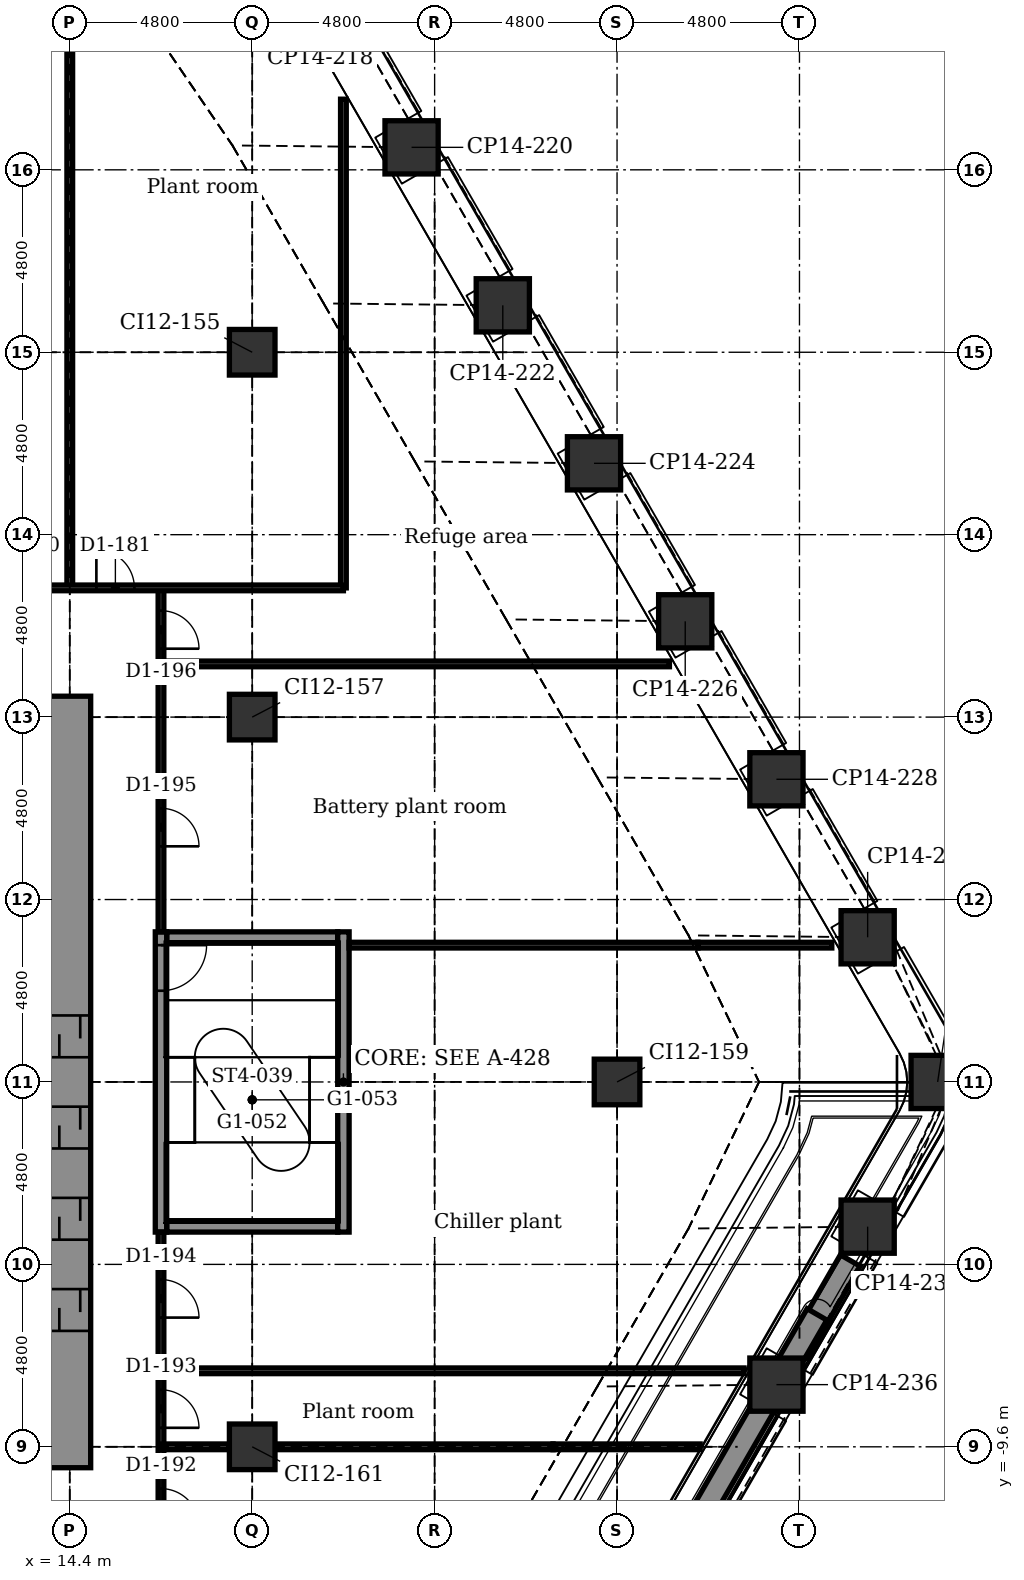
"""IFC4 building model, lengths in metres.
Left out: names, types, materials, properties, quantities, classifications, styles, units other than length and angle.
Written with IfcOpenShell. Run it as: python <this file> out.ifc"""

import sys

from ifc_helpers import new_model, si_unit, direction, frame, frame_2d, origin, origin_2d, place, context, subcontext, project, spatial, rectangle, extrude, element, fill, save


model = new_model("IFC4")
c1 = context("Model", 3, precision=1e-05, world=origin(), true_north=direction((0.0, 1.0)))
c2 = subcontext(c1, "Body", "Model", "MODEL_VIEW")
j1 = project(units=[si_unit("LENGTHUNIT", "METRE"), si_unit("PLANEANGLEUNIT", "RADIAN")], contexts=[c1])
p1 = place(None, origin())
s1 = spatial("IfcSite", under=j1, at=p1, CompositionType="ELEMENT")
p2 = place(p1, origin())
s2 = spatial("IfcBuilding", under=s1, at=p2, CompositionType="ELEMENT")
p3 = place(p2, frame((0.0, 0.0, 71.9)))
s3 = spatial("IfcBuildingStorey", under=s2, at=p3, CompositionType="ELEMENT", Elevation=71.9)
for number, where, z_axis, x_axis in (
    (1, (23.394, 24.592, -0.3), (0.0, 0.0, 1.0), (0.866, 0.5, 0.0)),
    (2, (25.794, 20.435, -0.3), (0.0, 0.0, 1.0), (0.866, 0.5, 0.0)),
    (3, (28.194, 16.278, -0.3), (0.0, 0.0, 1.0), (0.866, 0.5, 0.0)),
    (4, (30.594, 12.121, -0.3), (0.0, 0.0, 1.0), (0.866, 0.5, 0.0)),
    (5, (32.994, 7.964, -0.3), (0.0, 0.0, 1.0), (0.866, 0.5, 0.0)),
    (6, (35.394, 3.807, -0.3), (0.0, 0.0, 1.0), (0.866, 0.5, 0.0)),
    (7, (37.236, 0.0, -0.3), (0.0, 0.0, 1.0), (1.0, 0.0, 0.0)),
    (8, (35.394, -3.807, -0.3), (0.0, 0.0, 1.0), (0.5, 0.866, 0.0)),
    (9, (32.994, -7.964, -0.3), (0.0, 0.0, 1.0), (0.5, 0.866, 0.0)),
):
    element("IfcColumn", number, at=place(p3, frame(where, z_axis=z_axis, x_axis=x_axis)), inside=s3, PredefinedType="COLUMN", context=c2, shape_type="SweptSolid", body=[
        extrude(rectangle(XDim=1.4, YDim=1.4, at=origin_2d()), origin(), (0.0, 0.0, 1.0), 6.1),
    ])
for number, where, z_axis, x_axis in (
    (10, (19.2, -9.6, -0.3), (0.0, 0.0, 1.0), (1.0, 0.0, 0.0)),
    (11, (19.2, 9.6, -0.3), (0.0, 0.0, 1.0), (1.0, 0.0, 0.0)),
    (12, (19.2, 19.2, -0.3), (0.0, 0.0, 1.0), (1.0, 0.0, 0.0)),
    (13, (28.8, 0.0, -0.3), (0.0, 0.0, 1.0), (1.0, 0.0, 0.0)),
):
    element("IfcColumn", number, at=place(p3, frame(where, z_axis=z_axis, x_axis=x_axis)), inside=s3, PredefinedType="COLUMN", context=c2, shape_type="SweptSolid", body=[
        extrude(rectangle(XDim=1.2, YDim=1.2, at=origin_2d()), origin(), (0.0, 0.0, 1.0), 6.1),
    ])
for number, where, z_axis, x_axis in (
    (14, (16.95, -3.8, -0.3), (0.0, 0.0, 1.0), (1.0, 0.0, 0.0)),
    (15, (16.95, 3.8, -0.3), (0.0, 0.0, 1.0), (1.0, 0.0, 0.0)),
):
    element("IfcWall", number, at=place(p3, frame(where, z_axis=z_axis, x_axis=x_axis)), inside=s3, PredefinedType="STANDARD", context=c2, shape_type="SweptSolid", body=[
        extrude(rectangle(XDim=4.5, YDim=0.3, at=frame_2d((2.25, 0.0))), origin(), (0.0, 0.0, 1.0), 6.1),
    ])
p4 = place(p3, frame((14.4, -10.15, -0.3), z_axis=(0.0, 0.0, 1.0), x_axis=(0.0, 1.0, 0.0)))
e16 = element("IfcWall", 16, at=p4, inside=s3, PredefinedType="SHEAR", context=c2, shape_type="SweptSolid", body=[
    extrude(rectangle(XDim=20.3, YDim=1.1, at=frame_2d((10.15, 0.0))), origin(), (0.0, 0.0, 1.0), 6.1),
])
p5 = place(p4, frame((3.6, 0.0, 0.3)))
e17 = element("IfcOpeningElement", 17, at=p5, cuts=e16, PredefinedType="OPENING", context=c2, shape_type="SweptSolid", body=[
    extrude(rectangle(XDim=1.1, YDim=2.1, at=frame_2d((0.55, 1.05))), frame((0.0, 0.56, 0.0), z_axis=(0.0, -1.0, 0.0), x_axis=(1.0, 0.0, 0.0)), (0.0, 0.0, 1.0), 1.12),
])
p6 = place(p4, frame((6.0, 0.0, 0.3)))
e18 = element("IfcOpeningElement", 18, at=p6, cuts=e16, PredefinedType="OPENING", context=c2, shape_type="SweptSolid", body=[
    extrude(rectangle(XDim=1.1, YDim=2.1, at=frame_2d((0.55, 1.05))), frame((0.0, 0.56, 0.0), z_axis=(0.0, -1.0, 0.0), x_axis=(1.0, 0.0, 0.0)), (0.0, 0.0, 1.0), 1.12),
])
p7 = place(p4, frame((8.4, 0.0, 0.3)))
e19 = element("IfcOpeningElement", 19, at=p7, cuts=e16, PredefinedType="OPENING", context=c2, shape_type="SweptSolid", body=[
    extrude(rectangle(XDim=1.1, YDim=2.1, at=frame_2d((0.55, 1.05))), frame((0.0, 0.56, 0.0), z_axis=(0.0, -1.0, 0.0), x_axis=(1.0, 0.0, 0.0)), (0.0, 0.0, 1.0), 1.12),
])
p8 = place(p4, frame((10.8, 0.0, 0.3)))
e20 = element("IfcOpeningElement", 20, at=p8, cuts=e16, PredefinedType="OPENING", context=c2, shape_type="SweptSolid", body=[
    extrude(rectangle(XDim=1.1, YDim=2.1, at=frame_2d((0.55, 1.05))), frame((0.0, 0.56, 0.0), z_axis=(0.0, -1.0, 0.0), x_axis=(1.0, 0.0, 0.0)), (0.0, 0.0, 1.0), 1.12),
])
p9 = place(p3, frame((16.8, -3.95, -0.3), z_axis=(0.0, 0.0, 1.0), x_axis=(0.0, 1.0, 0.0)))
e21 = element("IfcWall", 21, at=p9, inside=s3, PredefinedType="STANDARD", context=c2, shape_type="SweptSolid", body=[
    extrude(rectangle(XDim=7.9, YDim=0.3, at=frame_2d((3.95, 0.0))), origin(), (0.0, 0.0, 1.0), 6.1),
])
p10 = place(p9, frame((6.35, 0.0, 0.3)))
e22 = element("IfcOpeningElement", 22, at=p10, cuts=e21, PredefinedType="OPENING", context=c2, shape_type="SweptSolid", body=[
    extrude(rectangle(XDim=1.2, YDim=2.1, at=frame_2d((0.6, 1.05))), frame((0.0, 0.16, 0.0), z_axis=(0.0, -1.0, 0.0), x_axis=(1.0, 0.0, 0.0)), (0.0, 0.0, 1.0), 0.32),
])
p11 = place(p3, frame((21.6, -3.95, -0.3), z_axis=(0.0, 0.0, 1.0), x_axis=(0.0, 1.0, 0.0)))
e23 = element("IfcWall", 23, at=p11, inside=s3, PredefinedType="STANDARD", context=c2, shape_type="SweptSolid", body=[
    extrude(rectangle(XDim=7.9, YDim=0.3, at=frame_2d((3.95, 0.0))), origin(), (0.0, 0.0, 1.0), 6.1),
])
p12 = place(p3, frame((34.937, -4.698, 0.0), z_axis=(0.0, 0.0, 1.0), x_axis=(-0.49998411664, -0.866034573852, 0.0)))
e24 = element("IfcWall", 24, at=p12, inside=s3, PredefinedType="USERDEFINED", context=c2, shape_type="SweptSolid", body=[
    extrude(rectangle(XDim=2.8, YDim=0.6, at=frame_2d((1.4, 0.0))), origin(), (0.0, 0.0, 1.0), 0.7),
])
p13 = place(p3, frame((34.061, -6.116, 6.0), z_axis=(0.0, 0.0, 1.0), x_axis=(-0.499990139034, -0.866031096941, 0.0)))
e25 = element("IfcWall", 25, at=p13, inside=s3, PredefinedType="USERDEFINED", context=c2, shape_type="SweptSolid", body=[
    extrude(rectangle(XDim=6.0, YDim=0.6, at=frame_2d((3.0, 0.0))), origin(), (0.0, 0.0, 1.0), 0.7),
])
p14 = place(p3, frame((21.6, 13.0, 0.0), z_axis=(0.0, 0.0, 1.0), x_axis=(0.0, 1.0, 0.0)))
e26 = element("IfcWall", 26, at=p14, inside=s3, PredefinedType="PARTITIONING", context=c2, shape_type="SweptSolid", body=[
    extrude(rectangle(XDim=12.858, YDim=0.15, at=frame_2d((6.429, 0.0))), origin(), (0.0, 0.0, 1.0), 5.8),
])
p15 = place(p3, frame((16.8, -12.4, 0.0), z_axis=(0.0, 0.0, 1.0), x_axis=(0.0, 1.0, 0.0)))
e27 = element("IfcWall", 27, at=p15, inside=s3, PredefinedType="PARTITIONING", context=c2, shape_type="SweptSolid", body=[
    extrude(rectangle(XDim=8.45, YDim=0.15, at=frame_2d((4.225, 0.0))), origin(), (0.0, 0.0, 1.0), 5.8),
])
p16 = place(p15, frame((0.7, 0.0, 0.0)))
e28 = element("IfcOpeningElement", 28, at=p16, cuts=e27, PredefinedType="OPENING", context=c2, shape_type="SweptSolid", body=[
    extrude(rectangle(XDim=1.0, YDim=2.1, at=frame_2d((0.5, 1.05))), frame((0.0, 0.085, 0.0), z_axis=(0.0, -1.0, 0.0), x_axis=(1.0, 0.0, 0.0)), (0.0, 0.0, 1.0), 0.17),
])
p17 = place(p15, frame((3.3, 0.0, 0.0)))
e29 = element("IfcOpeningElement", 29, at=p17, cuts=e27, PredefinedType="OPENING", context=c2, shape_type="SweptSolid", body=[
    extrude(rectangle(XDim=1.0, YDim=2.1, at=frame_2d((0.5, 1.05))), frame((0.0, 0.085, 0.0), z_axis=(0.0, -1.0, 0.0), x_axis=(1.0, 0.0, 0.0)), (0.0, 0.0, 1.0), 0.17),
])
p18 = place(p15, frame((6.2, 0.0, 0.0)))
e30 = element("IfcOpeningElement", 30, at=p18, cuts=e27, PredefinedType="OPENING", context=c2, shape_type="SweptSolid", body=[
    extrude(rectangle(XDim=1.0, YDim=2.1, at=frame_2d((0.5, 1.05))), frame((0.0, 0.085, 0.0), z_axis=(0.0, -1.0, 0.0), x_axis=(1.0, 0.0, 0.0)), (0.0, 0.0, 1.0), 0.17),
])
p19 = place(p3, frame((16.8, 3.95, 0.0), z_axis=(0.0, 0.0, 1.0), x_axis=(0.0, 1.0, 0.0)))
e31 = element("IfcWall", 31, at=p19, inside=s3, PredefinedType="PARTITIONING", context=c2, shape_type="SweptSolid", body=[
    extrude(rectangle(XDim=9.05, YDim=0.15, at=frame_2d((4.525, 0.0))), origin(), (0.0, 0.0, 1.0), 5.8),
])
p20 = place(p19, frame((2.25, 0.0, 0.0)))
e32 = element("IfcOpeningElement", 32, at=p20, cuts=e31, PredefinedType="OPENING", context=c2, shape_type="SweptSolid", body=[
    extrude(rectangle(XDim=1.0, YDim=2.1, at=frame_2d((0.5, 1.05))), frame((0.0, 0.085, 0.0), z_axis=(0.0, -1.0, 0.0), x_axis=(1.0, 0.0, 0.0)), (0.0, 0.0, 1.0), 0.17),
])
p21 = place(p19, frame((7.45, 0.0, 0.0)))
e33 = element("IfcOpeningElement", 33, at=p21, cuts=e31, PredefinedType="OPENING", context=c2, shape_type="SweptSolid", body=[
    extrude(rectangle(XDim=1.0, YDim=2.1, at=frame_2d((0.5, 1.05))), frame((0.0, 0.085, 0.0), z_axis=(0.0, -1.0, 0.0), x_axis=(1.0, 0.0, 0.0)), (0.0, 0.0, 1.0), 0.17),
])
p22 = place(p3, frame((14.4, 13.0, 0.0), z_axis=(0.0, 0.0, 1.0), x_axis=(0.0, 1.0, 0.0)))
e34 = element("IfcWall", 34, at=p22, inside=s3, PredefinedType="PARTITIONING", context=c2, shape_type="SweptSolid", body=[
    extrude(rectangle(XDim=15.107, YDim=0.15, at=frame_2d((7.553, 0.0))), origin(), (0.0, 0.0, 1.0), 5.343),
])
p23 = place(p3, frame((16.8, -9.6, 0.0), z_axis=(0.0, 0.0, 1.0), x_axis=(1.0, 0.0, 0.0)))
e35 = element("IfcWall", 35, at=p23, inside=s3, PredefinedType="PARTITIONING", context=c2, shape_type="SweptSolid", body=[
    extrude(rectangle(XDim=1.8, YDim=0.15, at=frame_2d((0.9, 0.0))), origin(), (0.0, 0.0, 1.0), 5.192),
])
p24 = place(p3, frame((19.8, -9.6, 0.0), z_axis=(0.0, 0.0, 1.0), x_axis=(1.0, 0.0, 0.0)))
e36 = element("IfcWall", 36, at=p24, inside=s3, PredefinedType="PARTITIONING", context=c2, shape_type="SweptSolid", body=[
    extrude(rectangle(XDim=7.316, YDim=0.15, at=frame_2d((3.658, 0.0))), origin(), (0.0, 0.0, 1.0), 5.192),
])
p25 = place(p3, frame((27.116, -9.6, 0.0), z_axis=(0.0, 0.0, 1.0), x_axis=(1.0, 0.0, 0.0)))
e37 = element("IfcWall", 37, at=p25, inside=s3, PredefinedType="PARTITIONING", context=c2, shape_type="SweptSolid", body=[
    extrude(rectangle(XDim=3.871, YDim=0.15, at=frame_2d((1.936, 0.0))), origin(), (0.0, 0.0, 1.0), 5.7),
])
p26 = place(p3, frame((16.8, -7.6, 0.0), z_axis=(0.0, 0.0, 1.0), x_axis=(1.0, 0.0, 0.0)))
e38 = element("IfcWall", 38, at=p26, inside=s3, PredefinedType="PARTITIONING", context=c2, shape_type="SweptSolid", body=[
    extrude(rectangle(XDim=15.342, YDim=0.15, at=frame_2d((7.671, 0.0))), origin(), (0.0, 0.0, 1.0), 5.7),
])
p27 = place(p3, frame((21.75, 3.6, 0.0), z_axis=(0.0, 0.0, 1.0), x_axis=(1.0, 0.0, 0.0)))
e39 = element("IfcWall", 39, at=p27, inside=s3, PredefinedType="PARTITIONING", context=c2, shape_type="SweptSolid", body=[
    extrude(rectangle(XDim=9.178, YDim=0.15, at=frame_2d((4.589, 0.0))), origin(), (0.0, 0.0, 1.0), 5.8),
])
p28 = place(p3, frame((30.928, 3.6, 0.0), z_axis=(0.0, 0.0, 1.0), x_axis=(1.0, 0.0, 0.0)))
e40 = element("IfcWall", 40, at=p28, inside=s3, PredefinedType="PARTITIONING", context=c2, shape_type="SweptSolid", body=[
    extrude(rectangle(XDim=3.523, YDim=0.15, at=frame_2d((1.762, 0.0))), origin(), (0.0, 0.0, 1.0), 4.0),
])
p29 = place(p3, frame((16.8, 11.0, 0.0), z_axis=(0.0, 0.0, 1.0), x_axis=(1.0, 0.0, 0.0)))
e41 = element("IfcWall", 41, at=p29, inside=s3, PredefinedType="PARTITIONING", context=c2, shape_type="SweptSolid", body=[
    extrude(rectangle(XDim=13.378, YDim=0.15, at=frame_2d((6.689, 0.0))), origin(), (0.0, 0.0, 1.0), 5.8),
])
p30 = place(p3, frame((-21.6, 13.0, 0.0), z_axis=(0.0, 0.0, 1.0), x_axis=(1.0, 0.0, 0.0)))
e42 = element("IfcWall", 42, at=p30, inside=s3, PredefinedType="PARTITIONING", context=c2, shape_type="SweptSolid", body=[
    extrude(rectangle(XDim=43.2, YDim=0.15, at=frame_2d((21.6, 0.0))), origin(), (0.0, 0.0, 1.0), 5.8),
])
p31 = place(p30, frame((5.5, 0.0, 0.0)))
e43 = element("IfcOpeningElement", 43, at=p31, cuts=e42, PredefinedType="OPENING", context=c2, shape_type="SweptSolid", body=[
    extrude(rectangle(XDim=1.0, YDim=2.1, at=frame_2d((0.5, 1.05))), frame((0.0, 0.085, 0.0), z_axis=(0.0, -1.0, 0.0), x_axis=(1.0, 0.0, 0.0)), (0.0, 0.0, 1.0), 0.17),
])
p32 = place(p30, frame((7.9, 0.0, 0.0)))
e44 = element("IfcOpeningElement", 44, at=p32, cuts=e42, PredefinedType="OPENING", context=c2, shape_type="SweptSolid", body=[
    extrude(rectangle(XDim=1.0, YDim=2.1, at=frame_2d((0.5, 1.05))), frame((0.0, 0.085, 0.0), z_axis=(0.0, -1.0, 0.0), x_axis=(1.0, 0.0, 0.0)), (0.0, 0.0, 1.0), 0.17),
])
p33 = place(p30, frame((10.3, 0.0, 0.0)))
e45 = element("IfcOpeningElement", 45, at=p33, cuts=e42, PredefinedType="OPENING", context=c2, shape_type="SweptSolid", body=[
    extrude(rectangle(XDim=1.0, YDim=2.1, at=frame_2d((0.5, 1.05))), frame((0.0, 0.085, 0.0), z_axis=(0.0, -1.0, 0.0), x_axis=(1.0, 0.0, 0.0)), (0.0, 0.0, 1.0), 0.17),
])
p34 = place(p30, frame((13.9, 0.0, 0.0)))
e46 = element("IfcOpeningElement", 46, at=p34, cuts=e42, PredefinedType="OPENING", context=c2, shape_type="SweptSolid", body=[
    extrude(rectangle(XDim=1.0, YDim=2.1, at=frame_2d((0.5, 1.05))), frame((0.0, 0.085, 0.0), z_axis=(0.0, -1.0, 0.0), x_axis=(1.0, 0.0, 0.0)), (0.0, 0.0, 1.0), 0.17),
])
p35 = place(p30, frame((23.5, 0.0, 0.0)))
e47 = element("IfcOpeningElement", 47, at=p35, cuts=e42, PredefinedType="OPENING", context=c2, shape_type="SweptSolid", body=[
    extrude(rectangle(XDim=1.0, YDim=2.1, at=frame_2d((0.5, 1.05))), frame((0.0, 0.085, 0.0), z_axis=(0.0, -1.0, 0.0), x_axis=(1.0, 0.0, 0.0)), (0.0, 0.0, 1.0), 0.17),
])
p36 = place(p30, frame((31.9, 0.0, 0.0)))
e48 = element("IfcOpeningElement", 48, at=p36, cuts=e42, PredefinedType="OPENING", context=c2, shape_type="SweptSolid", body=[
    extrude(rectangle(XDim=1.0, YDim=2.1, at=frame_2d((0.5, 1.05))), frame((0.0, 0.085, 0.0), z_axis=(0.0, -1.0, 0.0), x_axis=(1.0, 0.0, 0.0)), (0.0, 0.0, 1.0), 0.17),
])
p37 = place(p30, frame((34.3, 0.0, 0.0)))
e49 = element("IfcOpeningElement", 49, at=p37, cuts=e42, PredefinedType="OPENING", context=c2, shape_type="SweptSolid", body=[
    extrude(rectangle(XDim=1.0, YDim=2.1, at=frame_2d((0.5, 1.05))), frame((0.0, 0.085, 0.0), z_axis=(0.0, -1.0, 0.0), x_axis=(1.0, 0.0, 0.0)), (0.0, 0.0, 1.0), 0.17),
])
p38 = place(p30, frame((36.7, 0.0, 0.0)))
e50 = element("IfcOpeningElement", 50, at=p38, cuts=e42, PredefinedType="OPENING", context=c2, shape_type="SweptSolid", body=[
    extrude(rectangle(XDim=1.0, YDim=2.1, at=frame_2d((0.5, 1.05))), frame((0.0, 0.085, 0.0), z_axis=(0.0, -1.0, 0.0), x_axis=(1.0, 0.0, 0.0)), (0.0, 0.0, 1.0), 0.17),
])
p39 = place(p38, origin())
e51 = element("IfcDoor", 51, at=p39, inside=s3, OperationType="SINGLE_SWING_LEFT", PredefinedType="DOOR", context=c2, shape_type="SweptSolid", body=[
    extrude(rectangle(XDim=1.0, YDim=2.1, at=frame_2d((0.5, 1.05))), frame((0.0, 0.025, 0.0), z_axis=(0.0, -1.0, 0.0), x_axis=(1.0, 0.0, 0.0)), (0.0, 0.0, 1.0), 0.05),
])
fill(e50, e51)
p40 = place(p16, frame((1.0, 0.0, 0.0), z_axis=(0.0, 0.0, 1.0), x_axis=(-1.0, 0.0, 0.0)))
e52 = element("IfcDoor", 52, at=p40, inside=s3, OperationType="SINGLE_SWING_LEFT", PredefinedType="DOOR", context=c2, shape_type="SweptSolid", body=[
    extrude(rectangle(XDim=1.0, YDim=2.1, at=frame_2d((0.5, 1.05))), frame((0.0, 0.025, 0.0), z_axis=(0.0, -1.0, 0.0), x_axis=(1.0, 0.0, 0.0)), (0.0, 0.0, 1.0), 0.05),
])
fill(e28, e52)
p41 = place(p17, frame((1.0, 0.0, 0.0), z_axis=(0.0, 0.0, 1.0), x_axis=(-1.0, 0.0, 0.0)))
e53 = element("IfcDoor", 53, at=p41, inside=s3, OperationType="SINGLE_SWING_LEFT", PredefinedType="DOOR", context=c2, shape_type="SweptSolid", body=[
    extrude(rectangle(XDim=1.0, YDim=2.1, at=frame_2d((0.5, 1.05))), frame((0.0, 0.025, 0.0), z_axis=(0.0, -1.0, 0.0), x_axis=(1.0, 0.0, 0.0)), (0.0, 0.0, 1.0), 0.05),
])
fill(e29, e53)
p42 = place(p18, frame((1.0, 0.0, 0.0), z_axis=(0.0, 0.0, 1.0), x_axis=(-1.0, 0.0, 0.0)))
e54 = element("IfcDoor", 54, at=p42, inside=s3, OperationType="SINGLE_SWING_LEFT", PredefinedType="DOOR", context=c2, shape_type="SweptSolid", body=[
    extrude(rectangle(XDim=1.0, YDim=2.1, at=frame_2d((0.5, 1.05))), frame((0.0, 0.025, 0.0), z_axis=(0.0, -1.0, 0.0), x_axis=(1.0, 0.0, 0.0)), (0.0, 0.0, 1.0), 0.05),
])
fill(e30, e54)
p43 = place(p20, frame((1.0, 0.0, 0.0), z_axis=(0.0, 0.0, 1.0), x_axis=(-1.0, 0.0, 0.0)))
e55 = element("IfcDoor", 55, at=p43, inside=s3, OperationType="SINGLE_SWING_LEFT", PredefinedType="DOOR", context=c2, shape_type="SweptSolid", body=[
    extrude(rectangle(XDim=1.0, YDim=2.1, at=frame_2d((0.5, 1.05))), frame((0.0, 0.025, 0.0), z_axis=(0.0, -1.0, 0.0), x_axis=(1.0, 0.0, 0.0)), (0.0, 0.0, 1.0), 0.05),
])
fill(e32, e55)
p44 = place(p21, frame((1.0, 0.0, 0.0), z_axis=(0.0, 0.0, 1.0), x_axis=(-1.0, 0.0, 0.0)))
e56 = element("IfcDoor", 56, at=p44, inside=s3, OperationType="SINGLE_SWING_LEFT", PredefinedType="DOOR", context=c2, shape_type="SweptSolid", body=[
    extrude(rectangle(XDim=1.0, YDim=2.1, at=frame_2d((0.5, 1.05))), frame((0.0, 0.025, 0.0), z_axis=(0.0, -1.0, 0.0), x_axis=(1.0, 0.0, 0.0)), (0.0, 0.0, 1.0), 0.05),
])
fill(e33, e56)
p45 = place(p5, origin())
e57 = element("IfcDoor", 57, at=p45, inside=s3, OperationType="DOUBLE_DOOR_SLIDING", PredefinedType="DOOR", context=c2, shape_type="SweptSolid", body=[
    extrude(rectangle(XDim=1.1, YDim=2.1, at=frame_2d((0.55, 1.05))), frame((0.0, 0.025, 0.0), z_axis=(0.0, -1.0, 0.0), x_axis=(1.0, 0.0, 0.0)), (0.0, 0.0, 1.0), 0.05),
])
fill(e17, e57)
p46 = place(p6, origin())
e58 = element("IfcDoor", 58, at=p46, inside=s3, OperationType="DOUBLE_DOOR_SLIDING", PredefinedType="DOOR", context=c2, shape_type="SweptSolid", body=[
    extrude(rectangle(XDim=1.1, YDim=2.1, at=frame_2d((0.55, 1.05))), frame((0.0, 0.025, 0.0), z_axis=(0.0, -1.0, 0.0), x_axis=(1.0, 0.0, 0.0)), (0.0, 0.0, 1.0), 0.05),
])
fill(e18, e58)
p47 = place(p7, origin())
e59 = element("IfcDoor", 59, at=p47, inside=s3, OperationType="DOUBLE_DOOR_SLIDING", PredefinedType="DOOR", context=c2, shape_type="SweptSolid", body=[
    extrude(rectangle(XDim=1.1, YDim=2.1, at=frame_2d((0.55, 1.05))), frame((0.0, 0.025, 0.0), z_axis=(0.0, -1.0, 0.0), x_axis=(1.0, 0.0, 0.0)), (0.0, 0.0, 1.0), 0.05),
])
fill(e19, e59)
p48 = place(p8, origin())
e60 = element("IfcDoor", 60, at=p48, inside=s3, OperationType="DOUBLE_DOOR_SLIDING", PredefinedType="DOOR", context=c2, shape_type="SweptSolid", body=[
    extrude(rectangle(XDim=1.1, YDim=2.1, at=frame_2d((0.55, 1.05))), frame((0.0, 0.025, 0.0), z_axis=(0.0, -1.0, 0.0), x_axis=(1.0, 0.0, 0.0)), (0.0, 0.0, 1.0), 0.05),
])
fill(e20, e60)
p49 = place(p10, frame((1.2, 0.0, 0.0), z_axis=(0.0, 0.0, 1.0), x_axis=(-1.0, 0.0, 0.0)))
e61 = element("IfcDoor", 61, at=p49, inside=s3, OperationType="SINGLE_SWING_RIGHT", PredefinedType="DOOR", context=c2, shape_type="SweptSolid", body=[
    extrude(rectangle(XDim=1.2, YDim=2.1, at=frame_2d((0.6, 1.05))), frame((0.0, 0.025, 0.0), z_axis=(0.0, -1.0, 0.0), x_axis=(1.0, 0.0, 0.0)), (0.0, 0.0, 1.0), 0.05),
])
fill(e22, e61)
save(model, sys.argv[1])
